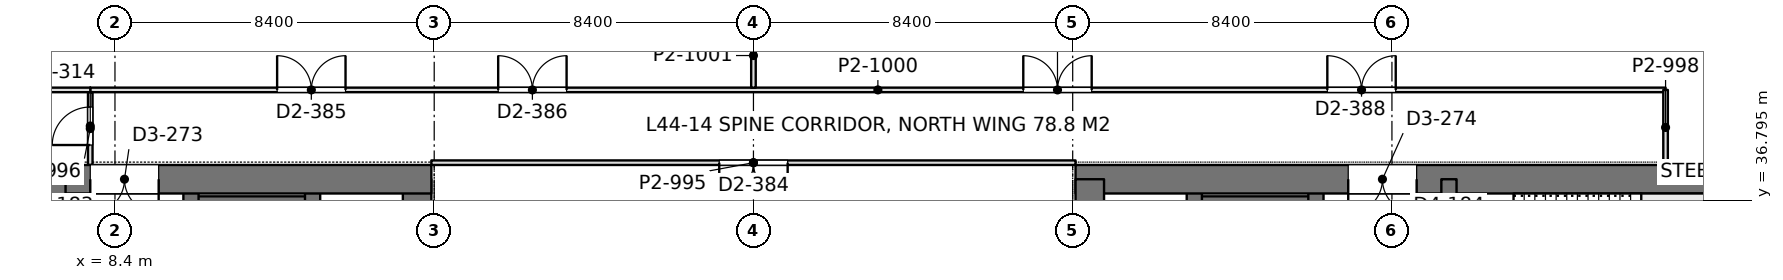
"""IFC4 building model, lengths in metres.
Left out: names, types, materials, properties, quantities, classifications, styles, units other than length and angle.
Written with IfcOpenShell. Run it as: python <this file> out.ifc"""

import sys

from ifc_helpers import new_model, si_unit, direction, frame, frame_2d, origin, place, context, subcontext, project, spatial, rectangle, extrude, element, fill, save


model = new_model("IFC4")
c1 = context("Model", 3, precision=1e-05, world=origin(), true_north=direction((0.0, 1.0)))
c2 = subcontext(c1, "Body", "Model", "MODEL_VIEW")
j1 = project(units=[si_unit("LENGTHUNIT", "METRE"), si_unit("PLANEANGLEUNIT", "RADIAN")], contexts=[c1])
p1 = place(None, origin())
s1 = spatial("IfcSite", under=j1, at=p1, CompositionType="ELEMENT")
p2 = place(p1, origin())
s2 = spatial("IfcBuilding", under=s1, at=p2, CompositionType="ELEMENT")
p3 = place(p2, frame((0.0, 0.0, 194.4)))
s3 = spatial("IfcBuildingStorey", under=s2, at=p3, CompositionType="ELEMENT", Elevation=194.4)
p4 = place(p3, frame((-1.125, 37.35, 0.0), z_axis=(0.0, 0.0, 1.0), x_axis=(1.0, 0.0, 0.0)))
e1 = element("IfcWall", 1, at=p4, inside=s3, PredefinedType="SHEAR", context=c2, shape_type="SweptSolid", body=[
    extrude(rectangle(XDim=17.85, YDim=0.75, at=frame_2d((8.925, 0.0))), origin(), (0.0, 0.0, 1.0), 4.2),
])
p5 = place(p4, frame((8.875, 0.0, 0.0)))
e2 = element("IfcOpeningElement", 2, at=p5, cuts=e1, PredefinedType="OPENING", context=c2, shape_type="SweptSolid", body=[
    extrude(rectangle(XDim=1.8, YDim=2.4, at=frame_2d((0.9, 1.2))), frame((0.0, 0.385, 0.0), z_axis=(0.0, -1.0, 0.0), x_axis=(1.0, 0.0, 0.0)), (0.0, 0.0, 1.0), 0.77),
])
p6 = place(p3, frame((16.35, 27.8, 0.0), z_axis=(0.0, 0.0, 1.0), x_axis=(0.0, 1.0, 0.0)))
e3 = element("IfcWall", 3, at=p6, inside=s3, PredefinedType="SHEAR", context=c2, shape_type="SweptSolid", body=[
    extrude(rectangle(XDim=9.55, YDim=0.75, at=frame_2d((4.775, 0.0))), origin(), (0.0, 0.0, 1.0), 4.2),
])
p7 = place(p3, frame((6.9, 13.05, 0.0), z_axis=(0.0, 0.0, 1.0), x_axis=(0.0, 1.0, 0.0)))
e4 = element("IfcWall", 4, at=p7, inside=s3, PredefinedType="SHEAR", context=c2, shape_type="SweptSolid", body=[
    extrude(rectangle(XDim=24.3, YDim=0.4, at=frame_2d((12.15, 0.0))), origin(), (0.0, 0.0, 1.0), 4.2),
])
p8 = place(p7, frame((1.3, 0.0, 0.0)))
e5 = element("IfcOpeningElement", 5, at=p8, cuts=e4, PredefinedType="OPENING", context=c2, shape_type="SweptSolid", body=[
    extrude(rectangle(XDim=1.0, YDim=2.2, at=frame_2d((0.5, 1.1))), frame((0.0, 0.21, 0.0), z_axis=(0.0, -1.0, 0.0), x_axis=(1.0, 0.0, 0.0)), (0.0, 0.0, 1.0), 0.42),
])
p9 = place(p7, frame((22.0, 0.0, 0.0)))
e6 = element("IfcOpeningElement", 6, at=p9, cuts=e4, PredefinedType="OPENING", context=c2, shape_type="SweptSolid", body=[
    extrude(rectangle(XDim=1.0, YDim=2.2, at=frame_2d((0.5, 1.1))), frame((0.0, 0.21, 0.0), z_axis=(0.0, -1.0, 0.0), x_axis=(1.0, 0.0, 0.0)), (0.0, 0.0, 1.0), 0.42),
])
p10 = place(p7, frame((5.55, 0.0, 0.0)))
e7 = element("IfcOpeningElement", 7, at=p10, cuts=e4, PredefinedType="OPENING", context=c2, shape_type="SweptSolid", body=[
    extrude(rectangle(XDim=1.0, YDim=2.2, at=frame_2d((0.5, 1.1))), frame((0.0, 0.21, 0.0), z_axis=(0.0, -1.0, 0.0), x_axis=(1.0, 0.0, 0.0)), (0.0, 0.0, 1.0), 0.42),
])
p11 = place(p7, frame((9.55, 0.0, 0.0)))
e8 = element("IfcOpeningElement", 8, at=p11, cuts=e4, PredefinedType="OPENING", context=c2, shape_type="SweptSolid", body=[
    extrude(rectangle(XDim=1.0, YDim=2.2, at=frame_2d((0.5, 1.1))), frame((0.0, 0.21, 0.0), z_axis=(0.0, -1.0, 0.0), x_axis=(1.0, 0.0, 0.0)), (0.0, 0.0, 1.0), 0.42),
])
p12 = place(p7, frame((12.8, 0.0, 0.0)))
e9 = element("IfcOpeningElement", 9, at=p12, cuts=e4, PredefinedType="OPENING", context=c2, shape_type="SweptSolid", body=[
    extrude(rectangle(XDim=1.1, YDim=2.2, at=frame_2d((0.55, 1.1))), frame((0.0, 0.21, 0.0), z_axis=(0.0, -1.0, 0.0), x_axis=(1.0, 0.0, 0.0)), (0.0, 0.0, 1.0), 0.42),
])
p13 = place(p7, frame((15.538, 0.0, 0.0)))
e10 = element("IfcOpeningElement", 10, at=p13, cuts=e4, PredefinedType="OPENING", context=c2, shape_type="SweptSolid", body=[
    extrude(rectangle(XDim=1.1, YDim=2.2, at=frame_2d((0.55, 1.1))), frame((0.0, 0.21, 0.0), z_axis=(0.0, -1.0, 0.0), x_axis=(1.0, 0.0, 0.0)), (0.0, 0.0, 1.0), 0.42),
])
p14 = place(p7, frame((18.262, 0.0, 0.0)))
e11 = element("IfcOpeningElement", 11, at=p14, cuts=e4, PredefinedType="OPENING", context=c2, shape_type="SweptSolid", body=[
    extrude(rectangle(XDim=1.1, YDim=2.2, at=frame_2d((0.55, 1.1))), frame((0.0, 0.21, 0.0), z_axis=(0.0, -1.0, 0.0), x_axis=(1.0, 0.0, 0.0)), (0.0, 0.0, 1.0), 0.42),
])
p15 = place(p3, frame((10.4, 13.05, 0.0), z_axis=(0.0, 0.0, 1.0), x_axis=(0.0, 1.0, 0.0)))
e12 = element("IfcWall", 12, at=p15, inside=s3, PredefinedType="SHEAR", context=c2, shape_type="SweptSolid", body=[
    extrude(rectangle(XDim=24.3, YDim=0.4, at=frame_2d((12.15, 0.0))), origin(), (0.0, 0.0, 1.0), 4.2),
])
p16 = place(p15, frame((15.75, 0.0, 0.0)))
e13 = element("IfcOpeningElement", 13, at=p16, cuts=e12, PredefinedType="OPENING", context=c2, shape_type="SweptSolid", body=[
    extrude(rectangle(XDim=1.1, YDim=2.2, at=frame_2d((0.55, 1.1))), frame((0.0, 0.21, 0.0), z_axis=(0.0, -1.0, 0.0), x_axis=(1.0, 0.0, 0.0)), (0.0, 0.0, 1.0), 0.42),
])
p17 = place(p15, frame((18.6, 0.0, 0.0)))
e14 = element("IfcOpeningElement", 14, at=p17, cuts=e12, PredefinedType="OPENING", context=c2, shape_type="SweptSolid", body=[
    extrude(rectangle(XDim=1.1, YDim=2.2, at=frame_2d((0.55, 1.1))), frame((0.0, 0.21, 0.0), z_axis=(0.0, -1.0, 0.0), x_axis=(1.0, 0.0, 0.0)), (0.0, 0.0, 1.0), 0.42),
])
p18 = place(p15, frame((21.45, 0.0, 0.0)))
e15 = element("IfcOpeningElement", 15, at=p18, cuts=e12, PredefinedType="OPENING", context=c2, shape_type="SweptSolid", body=[
    extrude(rectangle(XDim=1.1, YDim=2.2, at=frame_2d((0.55, 1.1))), frame((0.0, 0.21, 0.0), z_axis=(0.0, -1.0, 0.0), x_axis=(1.0, 0.0, 0.0)), (0.0, 0.0, 1.0), 0.42),
])
p19 = place(p15, frame((8.65, 0.0, 0.0)))
e16 = element("IfcOpeningElement", 16, at=p19, cuts=e12, PredefinedType="OPENING", context=c2, shape_type="SweptSolid", body=[
    extrude(rectangle(XDim=1.8, YDim=2.4, at=frame_2d((0.9, 1.2))), frame((0.0, 0.21, 0.0), z_axis=(0.0, -1.0, 0.0), x_axis=(1.0, 0.0, 0.0)), (0.0, 0.0, 1.0), 0.42),
])
p20 = place(p3, frame((13.6, 27.925, 0.0), z_axis=(0.0, 0.0, 1.0), x_axis=(0.0, 1.0, 0.0)))
e17 = element("IfcWall", 17, at=p20, inside=s3, PredefinedType="SHEAR", context=c2, shape_type="SweptSolid", body=[
    extrude(rectangle(XDim=9.425, YDim=0.4, at=frame_2d((4.712, 0.0))), origin(), (0.0, 0.0, 1.0), 4.2),
])
p21 = place(p3, frame((10.4, 36.625, 0.0), z_axis=(0.0, 0.0, 1.0), x_axis=(1.0, 0.0, 0.0)))
e18 = element("IfcWall", 18, at=p21, inside=s3, PredefinedType="SHEAR", context=c2, shape_type="SweptSolid", body=[
    extrude(rectangle(XDim=3.2, YDim=0.55, at=frame_2d((1.6, 0.0))), origin(), (0.0, 0.0, 1.0), 4.2),
])
p22 = place(p3, frame((33.675, 37.35, 0.0), z_axis=(0.0, 0.0, 1.0), x_axis=(1.0, 0.0, 0.0)))
e19 = element("IfcWall", 19, at=p22, inside=s3, PredefinedType="SHEAR", context=c2, shape_type="SweptSolid", body=[
    extrude(rectangle(XDim=17.85, YDim=0.75, at=frame_2d((8.925, 0.0))), origin(), (0.0, 0.0, 1.0), 4.2),
])
p23 = place(p22, frame((7.175, 0.0, 0.0)))
e20 = element("IfcOpeningElement", 20, at=p23, cuts=e19, PredefinedType="OPENING", context=c2, shape_type="SweptSolid", body=[
    extrude(rectangle(XDim=1.8, YDim=2.4, at=frame_2d((0.9, 1.2))), frame((0.0, 0.385, 0.0), z_axis=(0.0, -1.0, 0.0), x_axis=(1.0, 0.0, 0.0)), (0.0, 0.0, 1.0), 0.77),
])
p24 = place(p3, frame((34.05, 27.8, 0.0), z_axis=(0.0, 0.0, 1.0), x_axis=(0.0, 1.0, 0.0)))
e21 = element("IfcWall", 21, at=p24, inside=s3, PredefinedType="SHEAR", context=c2, shape_type="SweptSolid", body=[
    extrude(rectangle(XDim=9.55, YDim=0.75, at=frame_2d((4.775, 0.0))), origin(), (0.0, 0.0, 1.0), 4.2),
])
p25 = place(p3, frame((43.5, 13.05, 0.0), z_axis=(0.0, 0.0, 1.0), x_axis=(0.0, 1.0, 0.0)))
e22 = element("IfcWall", 22, at=p25, inside=s3, PredefinedType="SHEAR", context=c2, shape_type="SweptSolid", body=[
    extrude(rectangle(XDim=24.3, YDim=0.4, at=frame_2d((12.15, 0.0))), origin(), (0.0, 0.0, 1.0), 4.2),
])
p26 = place(p25, frame((1.3, 0.0, 0.0)))
e23 = element("IfcOpeningElement", 23, at=p26, cuts=e22, PredefinedType="OPENING", context=c2, shape_type="SweptSolid", body=[
    extrude(rectangle(XDim=1.0, YDim=2.2, at=frame_2d((0.5, 1.1))), frame((0.0, 0.21, 0.0), z_axis=(0.0, -1.0, 0.0), x_axis=(1.0, 0.0, 0.0)), (0.0, 0.0, 1.0), 0.42),
])
p27 = place(p25, frame((22.0, 0.0, 0.0)))
e24 = element("IfcOpeningElement", 24, at=p27, cuts=e22, PredefinedType="OPENING", context=c2, shape_type="SweptSolid", body=[
    extrude(rectangle(XDim=1.0, YDim=2.2, at=frame_2d((0.5, 1.1))), frame((0.0, 0.21, 0.0), z_axis=(0.0, -1.0, 0.0), x_axis=(1.0, 0.0, 0.0)), (0.0, 0.0, 1.0), 0.42),
])
p28 = place(p25, frame((5.55, 0.0, 0.0)))
e25 = element("IfcOpeningElement", 25, at=p28, cuts=e22, PredefinedType="OPENING", context=c2, shape_type="SweptSolid", body=[
    extrude(rectangle(XDim=1.0, YDim=2.2, at=frame_2d((0.5, 1.1))), frame((0.0, 0.21, 0.0), z_axis=(0.0, -1.0, 0.0), x_axis=(1.0, 0.0, 0.0)), (0.0, 0.0, 1.0), 0.42),
])
p29 = place(p25, frame((9.55, 0.0, 0.0)))
e26 = element("IfcOpeningElement", 26, at=p29, cuts=e22, PredefinedType="OPENING", context=c2, shape_type="SweptSolid", body=[
    extrude(rectangle(XDim=1.0, YDim=2.2, at=frame_2d((0.5, 1.1))), frame((0.0, 0.21, 0.0), z_axis=(0.0, -1.0, 0.0), x_axis=(1.0, 0.0, 0.0)), (0.0, 0.0, 1.0), 0.42),
])
p30 = place(p25, frame((12.8, 0.0, 0.0)))
e27 = element("IfcOpeningElement", 27, at=p30, cuts=e22, PredefinedType="OPENING", context=c2, shape_type="SweptSolid", body=[
    extrude(rectangle(XDim=1.1, YDim=2.2, at=frame_2d((0.55, 1.1))), frame((0.0, 0.21, 0.0), z_axis=(0.0, -1.0, 0.0), x_axis=(1.0, 0.0, 0.0)), (0.0, 0.0, 1.0), 0.42),
])
p31 = place(p25, frame((15.538, 0.0, 0.0)))
e28 = element("IfcOpeningElement", 28, at=p31, cuts=e22, PredefinedType="OPENING", context=c2, shape_type="SweptSolid", body=[
    extrude(rectangle(XDim=1.1, YDim=2.2, at=frame_2d((0.55, 1.1))), frame((0.0, 0.21, 0.0), z_axis=(0.0, -1.0, 0.0), x_axis=(1.0, 0.0, 0.0)), (0.0, 0.0, 1.0), 0.42),
])
p32 = place(p25, frame((18.262, 0.0, 0.0)))
e29 = element("IfcOpeningElement", 29, at=p32, cuts=e22, PredefinedType="OPENING", context=c2, shape_type="SweptSolid", body=[
    extrude(rectangle(XDim=1.1, YDim=2.2, at=frame_2d((0.55, 1.1))), frame((0.0, 0.21, 0.0), z_axis=(0.0, -1.0, 0.0), x_axis=(1.0, 0.0, 0.0)), (0.0, 0.0, 1.0), 0.42),
])
p33 = place(p3, frame((40.0, 13.05, 0.0), z_axis=(0.0, 0.0, 1.0), x_axis=(0.0, 1.0, 0.0)))
e30 = element("IfcWall", 30, at=p33, inside=s3, PredefinedType="SHEAR", context=c2, shape_type="SweptSolid", body=[
    extrude(rectangle(XDim=24.3, YDim=0.4, at=frame_2d((12.15, 0.0))), origin(), (0.0, 0.0, 1.0), 4.2),
])
p34 = place(p33, frame((15.75, 0.0, 0.0)))
e31 = element("IfcOpeningElement", 31, at=p34, cuts=e30, PredefinedType="OPENING", context=c2, shape_type="SweptSolid", body=[
    extrude(rectangle(XDim=1.1, YDim=2.2, at=frame_2d((0.55, 1.1))), frame((0.0, 0.21, 0.0), z_axis=(0.0, -1.0, 0.0), x_axis=(1.0, 0.0, 0.0)), (0.0, 0.0, 1.0), 0.42),
])
p35 = place(p33, frame((18.6, 0.0, 0.0)))
e32 = element("IfcOpeningElement", 32, at=p35, cuts=e30, PredefinedType="OPENING", context=c2, shape_type="SweptSolid", body=[
    extrude(rectangle(XDim=1.1, YDim=2.2, at=frame_2d((0.55, 1.1))), frame((0.0, 0.21, 0.0), z_axis=(0.0, -1.0, 0.0), x_axis=(1.0, 0.0, 0.0)), (0.0, 0.0, 1.0), 0.42),
])
p36 = place(p33, frame((21.45, 0.0, 0.0)))
e33 = element("IfcOpeningElement", 33, at=p36, cuts=e30, PredefinedType="OPENING", context=c2, shape_type="SweptSolid", body=[
    extrude(rectangle(XDim=1.1, YDim=2.2, at=frame_2d((0.55, 1.1))), frame((0.0, 0.21, 0.0), z_axis=(0.0, -1.0, 0.0), x_axis=(1.0, 0.0, 0.0)), (0.0, 0.0, 1.0), 0.42),
])
p37 = place(p33, frame((8.65, 0.0, 0.0)))
e34 = element("IfcOpeningElement", 34, at=p37, cuts=e30, PredefinedType="OPENING", context=c2, shape_type="SweptSolid", body=[
    extrude(rectangle(XDim=1.8, YDim=2.4, at=frame_2d((0.9, 1.2))), frame((0.0, 0.21, 0.0), z_axis=(0.0, -1.0, 0.0), x_axis=(1.0, 0.0, 0.0)), (0.0, 0.0, 1.0), 0.42),
])
p38 = place(p3, frame((36.8, 27.925, 0.0), z_axis=(0.0, 0.0, 1.0), x_axis=(0.0, 1.0, 0.0)))
e35 = element("IfcWall", 35, at=p38, inside=s3, PredefinedType="SHEAR", context=c2, shape_type="SweptSolid", body=[
    extrude(rectangle(XDim=9.425, YDim=0.4, at=frame_2d((4.712, 0.0))), origin(), (0.0, 0.0, 1.0), 4.2),
])
p39 = place(p3, frame((40.0, 36.625, 0.0), z_axis=(0.0, 0.0, 1.0), x_axis=(-1.0, 0.0, 0.0)))
e36 = element("IfcWall", 36, at=p39, inside=s3, PredefinedType="SHEAR", context=c2, shape_type="SweptSolid", body=[
    extrude(rectangle(XDim=3.2, YDim=0.55, at=frame_2d((1.6, 0.0))), origin(), (0.0, 0.0, 1.0), 4.2),
])
p40 = place(p3, frame((25.2, 39.758, 0.0), z_axis=(0.0, 0.0, 1.0), x_axis=(0.0, 1.0, 0.0)))
e37 = element("IfcWall", 37, at=p40, inside=s3, PredefinedType="PARTITIONING", context=c2, shape_type="SweptSolid", body=[
    extrude(rectangle(XDim=1.693, YDim=0.12, at=frame_2d((0.846, 0.0))), origin(), (0.0, 0.0, 1.0), 3.55),
])
p41 = place(p3, frame((7.748, 39.7, 0.0), z_axis=(0.0, 0.0, 1.0), x_axis=(1.0, 0.0, 0.0)))
e38 = element("IfcWall", 38, at=p41, inside=s3, PredefinedType="PARTITIONING", context=c2, shape_type="SweptSolid", body=[
    extrude(rectangle(XDim=41.452, YDim=0.12, at=frame_2d((20.726, 0.0))), origin(), (0.0, 0.0, 1.0), 3.55),
])
p42 = place(p41, frame((4.919, 0.0, 0.0)))
e39 = element("IfcOpeningElement", 39, at=p42, cuts=e38, PredefinedType="OPENING", context=c2, shape_type="SweptSolid", body=[
    extrude(rectangle(XDim=1.8, YDim=2.2, at=frame_2d((0.9, 1.1))), frame((0.0, 0.07, 0.0), z_axis=(0.0, -1.0, 0.0), x_axis=(1.0, 0.0, 0.0)), (0.0, 0.0, 1.0), 0.14),
])
p43 = place(p41, frame((10.735, 0.0, 0.0)))
e40 = element("IfcOpeningElement", 40, at=p43, cuts=e38, PredefinedType="OPENING", context=c2, shape_type="SweptSolid", body=[
    extrude(rectangle(XDim=1.8, YDim=2.2, at=frame_2d((0.9, 1.1))), frame((0.0, 0.07, 0.0), z_axis=(0.0, -1.0, 0.0), x_axis=(1.0, 0.0, 0.0)), (0.0, 0.0, 1.0), 0.14),
])
p44 = place(p41, frame((24.552, 0.0, 0.0)))
e41 = element("IfcOpeningElement", 41, at=p44, cuts=e38, PredefinedType="OPENING", context=c2, shape_type="SweptSolid", body=[
    extrude(rectangle(XDim=1.8, YDim=2.2, at=frame_2d((0.9, 1.1))), frame((0.0, 0.07, 0.0), z_axis=(0.0, -1.0, 0.0), x_axis=(1.0, 0.0, 0.0)), (0.0, 0.0, 1.0), 0.14),
])
p45 = place(p41, frame((32.552, 0.0, 0.0)))
e42 = element("IfcOpeningElement", 42, at=p45, cuts=e38, PredefinedType="OPENING", context=c2, shape_type="SweptSolid", body=[
    extrude(rectangle(XDim=1.8, YDim=2.2, at=frame_2d((0.9, 1.1))), frame((0.0, 0.07, 0.0), z_axis=(0.0, -1.0, 0.0), x_axis=(1.0, 0.0, 0.0)), (0.0, 0.0, 1.0), 0.14),
])
p46 = place(p3, frame((7.75, 37.724, 0.0), z_axis=(0.0, 0.0, 1.0), x_axis=(0.0, 1.0, 0.0)))
e43 = element("IfcWall", 43, at=p46, inside=s3, PredefinedType="PARTITIONING", context=c2, shape_type="SweptSolid", body=[
    extrude(rectangle(XDim=1.918, YDim=0.12, at=frame_2d((0.959, 0.0))), origin(), (0.0, 0.0, 1.0), 4.05),
])
p47 = place(p46, frame((0.526, 0.0, 0.0)))
e44 = element("IfcOpeningElement", 44, at=p47, cuts=e43, PredefinedType="OPENING", context=c2, shape_type="SweptSolid", body=[
    extrude(rectangle(XDim=1.0, YDim=2.4, at=frame_2d((0.5, 1.2))), frame((0.0, 0.07, 0.0), z_axis=(0.0, -1.0, 0.0), x_axis=(1.0, 0.0, 0.0)), (0.0, 0.0, 1.0), 0.14),
])
p48 = place(p3, frame((49.2, 37.724, 0.0), z_axis=(0.0, 0.0, 1.0), x_axis=(0.0, 1.0, 0.0)))
e45 = element("IfcWall", 45, at=p48, inside=s3, PredefinedType="PARTITIONING", context=c2, shape_type="SweptSolid", body=[
    extrude(rectangle(XDim=1.976, YDim=0.12, at=frame_2d((0.988, 0.0))), origin(), (0.0, 0.0, 1.0), 4.05),
])
p49 = place(p3, frame((1.2, 39.7, 0.0), z_axis=(0.0, 0.0, 1.0), x_axis=(1.0, 0.0, 0.0)))
e46 = element("IfcWall", 46, at=p49, inside=s3, PredefinedType="PARTITIONING", context=c2, shape_type="SweptSolid", body=[
    extrude(rectangle(XDim=6.552, YDim=0.12, at=frame_2d((3.276, 0.0))), origin(), (0.0, 0.0, 1.0), 3.69),
])
p50 = place(p3, frame((16.725, 37.785, 0.0), z_axis=(0.0, 0.0, 1.0), x_axis=(1.0, 0.0, 0.0)))
e47 = element("IfcWall", 47, at=p50, inside=s3, PredefinedType="PARTITIONING", context=c2, shape_type="SweptSolid", body=[
    extrude(rectangle(XDim=16.95, YDim=0.12, at=frame_2d((8.475, 0.0))), origin(), (0.0, 0.0, 1.0), 3.55),
])
p51 = place(p50, frame((7.575, 0.0, 0.0)))
e48 = element("IfcOpeningElement", 48, at=p51, cuts=e47, PredefinedType="OPENING", context=c2, shape_type="SweptSolid", body=[
    extrude(rectangle(XDim=1.8, YDim=2.2, at=frame_2d((0.9, 1.1))), frame((0.0, 0.07, 0.0), z_axis=(0.0, -1.0, 0.0), x_axis=(1.0, 0.0, 0.0)), (0.0, 0.0, 1.0), 0.14),
])
p52 = place(p5, frame((1.8, 0.0, 0.0), z_axis=(0.0, 0.0, 1.0), x_axis=(-1.0, 0.0, 0.0)))
e49 = element("IfcDoor", 49, at=p52, inside=s3, OperationType="DOUBLE_DOOR_SINGLE_SWING", PredefinedType="DOOR", context=c2, shape_type="SweptSolid", body=[
    extrude(rectangle(XDim=1.8, YDim=2.4, at=frame_2d((0.9, 1.2))), frame((0.0, 0.025, 0.0), z_axis=(0.0, -1.0, 0.0), x_axis=(1.0, 0.0, 0.0)), (0.0, 0.0, 1.0), 0.05),
])
fill(e2, e49)
p53 = place(p23, frame((1.8, 0.0, 0.0), z_axis=(0.0, 0.0, 1.0), x_axis=(-1.0, 0.0, 0.0)))
e50 = element("IfcDoor", 50, at=p53, inside=s3, OperationType="DOUBLE_DOOR_SINGLE_SWING", PredefinedType="DOOR", context=c2, shape_type="SweptSolid", body=[
    extrude(rectangle(XDim=1.8, YDim=2.4, at=frame_2d((0.9, 1.2))), frame((0.0, 0.025, 0.0), z_axis=(0.0, -1.0, 0.0), x_axis=(1.0, 0.0, 0.0)), (0.0, 0.0, 1.0), 0.05),
])
fill(e20, e50)
p54 = place(p42, origin())
e51 = element("IfcDoor", 51, at=p54, inside=s3, OperationType="DOUBLE_DOOR_SINGLE_SWING", PredefinedType="DOOR", context=c2, shape_type="SweptSolid", body=[
    extrude(rectangle(XDim=1.8, YDim=2.2, at=frame_2d((0.9, 1.1))), frame((0.0, 0.025, 0.0), z_axis=(0.0, -1.0, 0.0), x_axis=(1.0, 0.0, 0.0)), (0.0, 0.0, 1.0), 0.05),
])
fill(e39, e51)
p55 = place(p43, origin())
e52 = element("IfcDoor", 52, at=p55, inside=s3, OperationType="DOUBLE_DOOR_SINGLE_SWING", PredefinedType="DOOR", context=c2, shape_type="SweptSolid", body=[
    extrude(rectangle(XDim=1.8, YDim=2.2, at=frame_2d((0.9, 1.1))), frame((0.0, 0.025, 0.0), z_axis=(0.0, -1.0, 0.0), x_axis=(1.0, 0.0, 0.0)), (0.0, 0.0, 1.0), 0.05),
])
fill(e40, e52)
p56 = place(p44, origin())
e53 = element("IfcDoor", 53, at=p56, inside=s3, OperationType="DOUBLE_DOOR_SINGLE_SWING", PredefinedType="DOOR", context=c2, shape_type="SweptSolid", body=[
    extrude(rectangle(XDim=1.8, YDim=2.2, at=frame_2d((0.9, 1.1))), frame((0.0, 0.025, 0.0), z_axis=(0.0, -1.0, 0.0), x_axis=(1.0, 0.0, 0.0)), (0.0, 0.0, 1.0), 0.05),
])
fill(e41, e53)
p57 = place(p45, origin())
e54 = element("IfcDoor", 54, at=p57, inside=s3, OperationType="DOUBLE_DOOR_SINGLE_SWING", PredefinedType="DOOR", context=c2, shape_type="SweptSolid", body=[
    extrude(rectangle(XDim=1.8, YDim=2.2, at=frame_2d((0.9, 1.1))), frame((0.0, 0.025, 0.0), z_axis=(0.0, -1.0, 0.0), x_axis=(1.0, 0.0, 0.0)), (0.0, 0.0, 1.0), 0.05),
])
fill(e42, e54)
p58 = place(p47, origin())
e55 = element("IfcDoor", 55, at=p58, inside=s3, OperationType="SINGLE_SWING_LEFT", PredefinedType="DOOR", context=c2, shape_type="SweptSolid", body=[
    extrude(rectangle(XDim=1.0, YDim=2.4, at=frame_2d((0.5, 1.2))), frame((0.0, 0.025, 0.0), z_axis=(0.0, -1.0, 0.0), x_axis=(1.0, 0.0, 0.0)), (0.0, 0.0, 1.0), 0.05),
])
fill(e44, e55)
p59 = place(p51, frame((1.8, 0.0, 0.0), z_axis=(0.0, 0.0, 1.0), x_axis=(-1.0, 0.0, 0.0)))
e56 = element("IfcDoor", 56, at=p59, inside=s3, OperationType="DOUBLE_DOOR_SINGLE_SWING", PredefinedType="DOOR", context=c2, shape_type="SweptSolid", body=[
    extrude(rectangle(XDim=1.8, YDim=2.2, at=frame_2d((0.9, 1.1))), frame((0.0, 0.025, 0.0), z_axis=(0.0, -1.0, 0.0), x_axis=(1.0, 0.0, 0.0)), (0.0, 0.0, 1.0), 0.05),
])
fill(e48, e56)
save(model, sys.argv[1])
